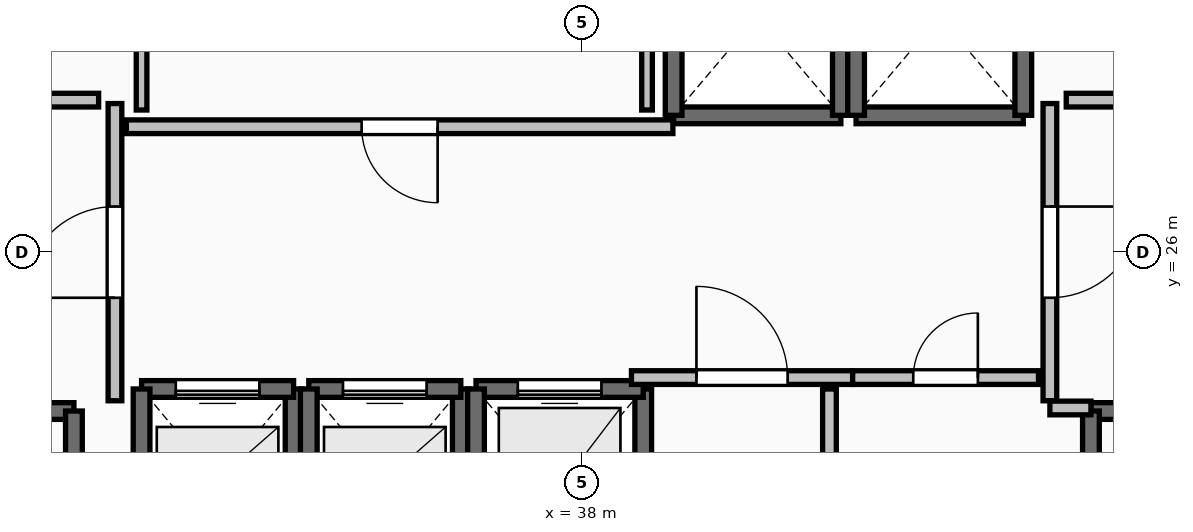
"""IFC4 building model, lengths in metres.
Left out: names, types, materials, properties, quantities, classifications, styles, units other than length and angle.
Written with IfcOpenShell. Run it as: python <this file> out.ifc"""

import sys

from ifc_helpers import new_model, si_unit, direction, frame, frame_2d, origin, place, context, subcontext, project, spatial, rectangle, extrude, element, fill, save


model = new_model("IFC4")
c1 = context("Model", 3, precision=1e-05, world=origin(), true_north=direction((0.0, 1.0)))
c2 = subcontext(c1, "Body", "Model", "MODEL_VIEW")
j1 = project(units=[si_unit("LENGTHUNIT", "METRE"), si_unit("PLANEANGLEUNIT", "RADIAN")], contexts=[c1])
p1 = place(None, origin())
s1 = spatial("IfcSite", under=j1, at=p1, CompositionType="ELEMENT")
p2 = place(p1, origin())
s2 = spatial("IfcBuilding", under=s1, at=p2, CompositionType="ELEMENT")
p3 = place(p2, frame((0.0, 0.0, 196.6)))
s3 = spatial("IfcBuildingStorey", under=s2, at=p3, CompositionType="ELEMENT", Elevation=196.6)
p4 = place(p3, frame((27.94, 23.91, 0.0), z_axis=(0.0, 0.0, 1.0), x_axis=(1.0, 0.0, 0.0)))
e1 = element("IfcWall", 1, at=p4, inside=s3, PredefinedType="SOLIDWALL", context=c2, shape_type="SweptSolid", body=[
    extrude(rectangle(XDim=3.37, YDim=0.22, at=frame_2d((1.685, 0.0))), origin(), (0.0, 0.0, 1.0), 3.24),
])
p5 = place(p4, frame((1.135, 0.0, 0.0)))
e2 = element("IfcOpeningElement", 2, at=p5, cuts=e1, PredefinedType="OPENING", context=c2, shape_type="SweptSolid", body=[
    extrude(rectangle(XDim=1.1, YDim=2.15, at=frame_2d((0.55, 1.075))), frame((0.0, 0.125, 0.0), z_axis=(0.0, -1.0, 0.0), x_axis=(1.0, 0.0, 0.0)), (0.0, 0.0, 1.0), 0.25),
])
p6 = place(p3, frame((31.31, 23.91, 0.0), z_axis=(0.0, 0.0, 1.0), x_axis=(0.0, -1.0, 0.0)))
e3 = element("IfcWall", 3, at=p6, inside=s3, PredefinedType="SOLIDWALL", context=c2, shape_type="SweptSolid", body=[
    extrude(rectangle(XDim=7.42, YDim=0.22, at=frame_2d((3.71, 0.0))), origin(), (0.0, 0.0, 1.0), 3.24),
])
p7 = place(p3, frame((44.69, 23.91, 0.0), z_axis=(0.0, 0.0, 1.0), x_axis=(1.0, 0.0, 0.0)))
e4 = element("IfcWall", 4, at=p7, inside=s3, PredefinedType="SOLIDWALL", context=c2, shape_type="SweptSolid", body=[
    extrude(rectangle(XDim=3.37, YDim=0.22, at=frame_2d((1.685, 0.0))), origin(), (0.0, 0.0, 1.0), 3.24),
])
p8 = place(p7, frame((1.135, 0.0, 0.0)))
e5 = element("IfcOpeningElement", 5, at=p8, cuts=e4, PredefinedType="OPENING", context=c2, shape_type="SweptSolid", body=[
    extrude(rectangle(XDim=1.1, YDim=2.15, at=frame_2d((0.55, 1.075))), frame((0.0, 0.125, 0.0), z_axis=(0.0, -1.0, 0.0), x_axis=(1.0, 0.0, 0.0)), (0.0, 0.0, 1.0), 0.25),
])
p9 = place(p3, frame((44.69, 16.49, 0.0), z_axis=(0.0, 0.0, 1.0), x_axis=(0.0, 1.0, 0.0)))
e6 = element("IfcWall", 6, at=p9, inside=s3, PredefinedType="SOLIDWALL", context=c2, shape_type="SweptSolid", body=[
    extrude(rectangle(XDim=7.42, YDim=0.22, at=frame_2d((3.71, 0.0))), origin(), (0.0, 0.0, 1.0), 3.24),
])
p10 = place(p3, frame((34.2, 21.8, 0.0), z_axis=(0.0, 0.0, 1.0), x_axis=(0.0, 1.0, 0.0)))
e7 = element("IfcWall", 7, at=p10, inside=s3, PredefinedType="SOLIDWALL", context=c2, shape_type="SweptSolid", body=[
    extrude(rectangle(XDim=2.4, YDim=0.22, at=frame_2d((1.2, 0.0))), origin(), (0.0, 0.0, 1.0), 3.24),
])
p11 = place(p3, frame((34.2, 24.2, 0.0), z_axis=(0.0, 0.0, 1.0), x_axis=(-1.0, 0.0, 0.0)))
e8 = element("IfcWall", 8, at=p11, inside=s3, PredefinedType="SOLIDWALL", context=c2, shape_type="SweptSolid", body=[
    extrude(rectangle(XDim=2.0, YDim=0.22, at=frame_2d((1.0, 0.0))), origin(), (0.0, 0.0, 1.0), 3.24),
])
p12 = place(p11, frame((0.45, 0.0, 0.0)))
e9 = element("IfcOpeningElement", 9, at=p12, cuts=e8, PredefinedType="OPENING", context=c2, shape_type="SweptSolid", body=[
    extrude(rectangle(XDim=1.1, YDim=2.2, at=frame_2d((0.55, 1.1))), frame((0.0, 0.125, 0.0), z_axis=(0.0, -1.0, 0.0), x_axis=(1.0, 0.0, 0.0)), (0.0, 0.0, 1.0), 0.25),
])
for number, where, z_axis, x_axis in (
    (10, (32.2, 24.2, 0.0), (0.0, 0.0, 1.0), (0.0, -1.0, 0.0)),
    (11, (36.4, 21.8, 0.0), (0.0, 0.0, 1.0), (0.0, 1.0, 0.0)),
):
    element("IfcWall", number, at=place(p3, frame(where, z_axis=z_axis, x_axis=x_axis)), inside=s3, PredefinedType="SOLIDWALL", context=c2, shape_type="SweptSolid", body=[
        extrude(rectangle(XDim=2.4, YDim=0.22, at=frame_2d((1.2, 0.0))), origin(), (0.0, 0.0, 1.0), 3.24),
    ])
p13 = place(p3, frame((36.4, 24.2, 0.0), z_axis=(0.0, 0.0, 1.0), x_axis=(-1.0, 0.0, 0.0)))
e12 = element("IfcWall", 12, at=p13, inside=s3, PredefinedType="SOLIDWALL", context=c2, shape_type="SweptSolid", body=[
    extrude(rectangle(XDim=2.0, YDim=0.22, at=frame_2d((1.0, 0.0))), origin(), (0.0, 0.0, 1.0), 3.24),
])
p14 = place(p13, frame((0.45, 0.0, 0.0)))
e13 = element("IfcOpeningElement", 13, at=p14, cuts=e12, PredefinedType="OPENING", context=c2, shape_type="SweptSolid", body=[
    extrude(rectangle(XDim=1.1, YDim=2.2, at=frame_2d((0.55, 1.1))), frame((0.0, 0.125, 0.0), z_axis=(0.0, -1.0, 0.0), x_axis=(1.0, 0.0, 0.0)), (0.0, 0.0, 1.0), 0.25),
])
p15 = place(p3, frame((34.4, 24.2, 0.0), z_axis=(0.0, 0.0, 1.0), x_axis=(0.0, -1.0, 0.0)))
e14 = element("IfcWall", 14, at=p15, inside=s3, PredefinedType="SOLIDWALL", context=c2, shape_type="SweptSolid", body=[
    extrude(rectangle(XDim=2.4, YDim=0.22, at=frame_2d((1.2, 0.0))), origin(), (0.0, 0.0, 1.0), 3.24),
])
p16 = place(p3, frame((38.8, 21.6, 0.0), z_axis=(0.0, 0.0, 1.0), x_axis=(0.0, 1.0, 0.0)))
e15 = element("IfcWall", 15, at=p16, inside=s3, PredefinedType="SOLIDWALL", context=c2, shape_type="SweptSolid", body=[
    extrude(rectangle(XDim=2.6, YDim=0.22, at=frame_2d((1.3, 0.0))), origin(), (0.0, 0.0, 1.0), 3.24),
])
p17 = place(p3, frame((38.8, 24.2, 0.0), z_axis=(0.0, 0.0, 1.0), x_axis=(-1.0, 0.0, 0.0)))
e16 = element("IfcWall", 16, at=p17, inside=s3, PredefinedType="SOLIDWALL", context=c2, shape_type="SweptSolid", body=[
    extrude(rectangle(XDim=2.2, YDim=0.22, at=frame_2d((1.1, 0.0))), origin(), (0.0, 0.0, 1.0), 3.24),
])
p18 = place(p17, frame((0.55, 0.0, 0.0)))
e17 = element("IfcOpeningElement", 17, at=p18, cuts=e16, PredefinedType="OPENING", context=c2, shape_type="SweptSolid", body=[
    extrude(rectangle(XDim=1.1, YDim=2.2, at=frame_2d((0.55, 1.1))), frame((0.0, 0.125, 0.0), z_axis=(0.0, -1.0, 0.0), x_axis=(1.0, 0.0, 0.0)), (0.0, 0.0, 1.0), 0.25),
])
p19 = place(p3, frame((36.6, 24.2, 0.0), z_axis=(0.0, 0.0, 1.0), x_axis=(0.0, -1.0, 0.0)))
e18 = element("IfcWall", 18, at=p19, inside=s3, PredefinedType="SOLIDWALL", context=c2, shape_type="SweptSolid", body=[
    extrude(rectangle(XDim=2.6, YDim=0.22, at=frame_2d((1.3, 0.0))), origin(), (0.0, 0.0, 1.0), 3.24),
])
p20 = place(p3, frame((39.2, 27.8, 0.0), z_axis=(0.0, 0.0, 1.0), x_axis=(1.0, 0.0, 0.0)))
e19 = element("IfcWall", 19, at=p20, inside=s3, PredefinedType="SOLIDWALL", context=c2, shape_type="SweptSolid", body=[
    extrude(rectangle(XDim=2.2, YDim=0.22, at=frame_2d((1.1, 0.0))), origin(), (0.0, 0.0, 1.0), 3.24),
])
for number, where, z_axis, x_axis in (
    (20, (41.4, 27.8, 0.0), (0.0, 0.0, 1.0), (0.0, 1.0, 0.0)),
    (21, (39.2, 30.4, 0.0), (0.0, 0.0, 1.0), (0.0, -1.0, 0.0)),
):
    element("IfcWall", number, at=place(p3, frame(where, z_axis=z_axis, x_axis=x_axis)), inside=s3, PredefinedType="SOLIDWALL", context=c2, shape_type="SweptSolid", body=[
        extrude(rectangle(XDim=2.6, YDim=0.22, at=frame_2d((1.3, 0.0))), origin(), (0.0, 0.0, 1.0), 3.24),
    ])
p21 = place(p3, frame((41.6, 27.8, 0.0), z_axis=(0.0, 0.0, 1.0), x_axis=(1.0, 0.0, 0.0)))
e22 = element("IfcWall", 22, at=p21, inside=s3, PredefinedType="SOLIDWALL", context=c2, shape_type="SweptSolid", body=[
    extrude(rectangle(XDim=2.2, YDim=0.22, at=frame_2d((1.1, 0.0))), origin(), (0.0, 0.0, 1.0), 3.24),
])
for number, where, z_axis, x_axis in (
    (23, (43.8, 27.8, 0.0), (0.0, 0.0, 1.0), (0.0, 1.0, 0.0)),
    (24, (41.6, 30.4, 0.0), (0.0, 0.0, 1.0), (0.0, -1.0, 0.0)),
):
    element("IfcWall", number, at=place(p3, frame(where, z_axis=z_axis, x_axis=x_axis)), inside=s3, PredefinedType="SOLIDWALL", context=c2, shape_type="SweptSolid", body=[
        extrude(rectangle(XDim=2.6, YDim=0.22, at=frame_2d((1.3, 0.0))), origin(), (0.0, 0.0, 1.0), 3.24),
    ])
p22 = place(p3, frame((31.85, 24.045, 0.0), z_axis=(0.0, 0.0, 1.0), x_axis=(0.0, 1.0, 0.0)))
e25 = element("IfcWall", 25, at=p22, inside=s3, PredefinedType="PARTITIONING", context=c2, shape_type="SweptSolid", body=[
    extrude(rectangle(XDim=3.91, YDim=0.18, at=frame_2d((1.955, 0.0))), origin(), (0.0, 0.0, 1.0), 3.24),
])
p23 = place(p22, frame((1.355, 0.0, 0.0)))
e26 = element("IfcOpeningElement", 26, at=p23, cuts=e25, PredefinedType="OPENING", context=c2, shape_type="SweptSolid", body=[
    extrude(rectangle(XDim=1.2, YDim=2.15, at=frame_2d((0.6, 1.075))), frame((0.0, 0.105, 0.0), z_axis=(0.0, -1.0, 0.0), x_axis=(1.0, 0.0, 0.0)), (0.0, 0.0, 1.0), 0.21),
])
p24 = place(p3, frame((44.15, 27.955, 0.0), z_axis=(0.0, 0.0, 1.0), x_axis=(0.0, -1.0, 0.0)))
e27 = element("IfcWall", 27, at=p24, inside=s3, PredefinedType="PARTITIONING", context=c2, shape_type="SweptSolid", body=[
    extrude(rectangle(XDim=3.91, YDim=0.18, at=frame_2d((1.955, 0.0))), origin(), (0.0, 0.0, 1.0), 3.24),
])
p25 = place(p24, frame((1.355, 0.0, 0.0)))
e28 = element("IfcOpeningElement", 28, at=p25, cuts=e27, PredefinedType="OPENING", context=c2, shape_type="SweptSolid", body=[
    extrude(rectangle(XDim=1.2, YDim=2.15, at=frame_2d((0.6, 1.075))), frame((0.0, 0.105, 0.0), z_axis=(0.0, -1.0, 0.0), x_axis=(1.0, 0.0, 0.0)), (0.0, 0.0, 1.0), 0.21),
])
p26 = place(p3, frame((44.15, 23.95, 0.0), z_axis=(0.0, 0.0, 1.0), x_axis=(1.0, 0.0, 0.0)))
e29 = element("IfcWall", 29, at=p26, inside=s3, PredefinedType="PARTITIONING", context=c2, shape_type="SweptSolid", body=[
    extrude(rectangle(XDim=0.54, YDim=0.18, at=frame_2d((0.27, 0.0))), origin(), (0.0, 0.0, 1.0), 3.24),
])
p27 = place(p3, frame((38.645, 24.35, 0.0), z_axis=(0.0, 0.0, 1.0), x_axis=(1.0, 0.0, 0.0)))
e30 = element("IfcWall", 30, at=p27, inside=s3, PredefinedType="PARTITIONING", context=c2, shape_type="SweptSolid", body=[
    extrude(rectangle(XDim=2.91, YDim=0.18, at=frame_2d((1.455, 0.0))), origin(), (0.0, 0.0, 1.0), 3.24),
])
p28 = place(p27, frame((0.855, 0.0, 0.0)))
e31 = element("IfcOpeningElement", 31, at=p28, cuts=e30, PredefinedType="OPENING", context=c2, shape_type="SweptSolid", body=[
    extrude(rectangle(XDim=1.2, YDim=2.15, at=frame_2d((0.6, 1.075))), frame((0.0, 0.105, 0.0), z_axis=(0.0, -1.0, 0.0), x_axis=(1.0, 0.0, 0.0)), (0.0, 0.0, 1.0), 0.21),
])
p29 = place(p3, frame((41.555, 24.35, 0.0), z_axis=(0.0, 0.0, 1.0), x_axis=(1.0, 0.0, 0.0)))
e32 = element("IfcWall", 32, at=p29, inside=s3, PredefinedType="PARTITIONING", context=c2, shape_type="SweptSolid", body=[
    extrude(rectangle(XDim=2.445, YDim=0.18, at=frame_2d((1.223, 0.0))), origin(), (0.0, 0.0, 1.0), 3.24),
])
p30 = place(p29, frame((0.798, 0.0, 0.0)))
e33 = element("IfcOpeningElement", 33, at=p30, cuts=e32, PredefinedType="OPENING", context=c2, shape_type="SweptSolid", body=[
    extrude(rectangle(XDim=0.85, YDim=2.1, at=frame_2d((0.425, 1.05))), frame((0.0, 0.105, 0.0), z_axis=(0.0, -1.0, 0.0), x_axis=(1.0, 0.0, 0.0)), (0.0, 0.0, 1.0), 0.21),
])
p31 = place(p3, frame((39.19, 27.65, 0.0), z_axis=(0.0, 0.0, 1.0), x_axis=(-1.0, 0.0, 0.0)))
e34 = element("IfcWall", 34, at=p31, inside=s3, PredefinedType="PARTITIONING", context=c2, shape_type="SweptSolid", body=[
    extrude(rectangle(XDim=7.19, YDim=0.18, at=frame_2d((3.595, 0.0))), origin(), (0.0, 0.0, 1.0), 3.24),
])
p32 = place(p31, frame((3.095, 0.0, 0.0)))
e35 = element("IfcOpeningElement", 35, at=p32, cuts=e34, PredefinedType="OPENING", context=c2, shape_type="SweptSolid", body=[
    extrude(rectangle(XDim=1.0, YDim=2.15, at=frame_2d((0.5, 1.075))), frame((0.0, 0.105, 0.0), z_axis=(0.0, -1.0, 0.0), x_axis=(1.0, 0.0, 0.0)), (0.0, 0.0, 1.0), 0.21),
])
p33 = place(p3, frame((41.25, 20.305, 0.0), z_axis=(0.0, 0.0, 1.0), x_axis=(0.0, 1.0, 0.0)))
e36 = element("IfcWall", 36, at=p33, inside=s3, PredefinedType="PARTITIONING", context=c2, shape_type="SweptSolid", body=[
    extrude(rectangle(XDim=3.895, YDim=0.18, at=frame_2d((1.948, 0.0))), origin(), (0.0, 0.0, 1.0), 3.24),
])
p34 = place(p33, frame((1.522, 0.0, 0.0)))
e37 = element("IfcOpeningElement", 37, at=p34, cuts=e36, PredefinedType="OPENING", context=c2, shape_type="SweptSolid", body=[
    extrude(rectangle(XDim=0.85, YDim=2.1, at=frame_2d((0.425, 1.05))), frame((0.0, 0.105, 0.0), z_axis=(0.0, -1.0, 0.0), x_axis=(1.0, 0.0, 0.0)), (0.0, 0.0, 1.0), 0.21),
])
for number, where, z_axis, x_axis in (
    (38, (31.635, 28.0, 0.0), (0.0, 0.0, 1.0), (-1.0, 0.0, 0.0)),
    (39, (45.28, 28.0, 0.0), (0.0, 0.0, 1.0), (-1.0, 0.0, 0.0)),
):
    element("IfcWall", number, at=place(p3, frame(where, z_axis=z_axis, x_axis=x_axis)), inside=s3, PredefinedType="PARTITIONING", context=c2, shape_type="SweptSolid", body=[
        extrude(rectangle(XDim=0.915, YDim=0.18, at=frame_2d((0.458, 0.0))), origin(), (0.0, 0.0, 1.0), 3.24),
    ])
for number, where, z_axis, x_axis in (
    (40, (32.2, 30.26, 0.0), (0.0, 0.0, 1.0), (0.0, -1.0, 0.0)),
    (41, (38.85, 27.87, 0.0), (0.0, 0.0, 1.0), (0.0, 1.0, 0.0)),
):
    element("IfcWall", number, at=place(p3, frame(where, z_axis=z_axis, x_axis=x_axis)), inside=s3, PredefinedType="PARTITIONING", context=c2, shape_type="SweptSolid", body=[
        extrude(rectangle(XDim=2.39, YDim=0.14, at=frame_2d((1.195, 0.0))), origin(), (0.0, 0.0, 1.0), 3.24),
    ])
p35 = place(p12, origin())
e42 = element("IfcDoor", 42, at=p35, inside=s3, OperationType="SLIDING_TO_LEFT", PredefinedType="DOOR", context=c2, shape_type="SweptSolid", body=[
    extrude(rectangle(XDim=1.1, YDim=2.2, at=frame_2d((0.55, 1.1))), frame((0.0, 0.025, 0.0), z_axis=(0.0, -1.0, 0.0), x_axis=(1.0, 0.0, 0.0)), (0.0, 0.0, 1.0), 0.05),
])
fill(e9, e42)
p36 = place(p14, origin())
e43 = element("IfcDoor", 43, at=p36, inside=s3, OperationType="SLIDING_TO_LEFT", PredefinedType="DOOR", context=c2, shape_type="SweptSolid", body=[
    extrude(rectangle(XDim=1.1, YDim=2.2, at=frame_2d((0.55, 1.1))), frame((0.0, 0.025, 0.0), z_axis=(0.0, -1.0, 0.0), x_axis=(1.0, 0.0, 0.0)), (0.0, 0.0, 1.0), 0.05),
])
fill(e13, e43)
p37 = place(p18, origin())
e44 = element("IfcDoor", 44, at=p37, inside=s3, OperationType="SLIDING_TO_LEFT", PredefinedType="DOOR", context=c2, shape_type="SweptSolid", body=[
    extrude(rectangle(XDim=1.1, YDim=2.2, at=frame_2d((0.55, 1.1))), frame((0.0, 0.025, 0.0), z_axis=(0.0, -1.0, 0.0), x_axis=(1.0, 0.0, 0.0)), (0.0, 0.0, 1.0), 0.05),
])
fill(e17, e44)
p38 = place(p23, origin())
e45 = element("IfcDoor", 45, at=p38, inside=s3, OperationType="SINGLE_SWING_LEFT", PredefinedType="DOOR", context=c2, shape_type="SweptSolid", body=[
    extrude(rectangle(XDim=1.2, YDim=2.15, at=frame_2d((0.6, 1.075))), frame((0.0, 0.025, 0.0), z_axis=(0.0, -1.0, 0.0), x_axis=(1.0, 0.0, 0.0)), (0.0, 0.0, 1.0), 0.05),
])
fill(e26, e45)
p39 = place(p25, origin())
e46 = element("IfcDoor", 46, at=p39, inside=s3, OperationType="SINGLE_SWING_LEFT", PredefinedType="DOOR", context=c2, shape_type="SweptSolid", body=[
    extrude(rectangle(XDim=1.2, YDim=2.15, at=frame_2d((0.6, 1.075))), frame((0.0, 0.025, 0.0), z_axis=(0.0, -1.0, 0.0), x_axis=(1.0, 0.0, 0.0)), (0.0, 0.0, 1.0), 0.05),
])
fill(e28, e46)
p40 = place(p28, origin())
e47 = element("IfcDoor", 47, at=p40, inside=s3, OperationType="SINGLE_SWING_LEFT", PredefinedType="DOOR", context=c2, shape_type="SweptSolid", body=[
    extrude(rectangle(XDim=1.2, YDim=2.15, at=frame_2d((0.6, 1.075))), frame((0.0, 0.025, 0.0), z_axis=(0.0, -1.0, 0.0), x_axis=(1.0, 0.0, 0.0)), (0.0, 0.0, 1.0), 0.05),
])
fill(e31, e47)
p41 = place(p30, origin())
e48 = element("IfcDoor", 48, at=p41, inside=s3, OperationType="SINGLE_SWING_RIGHT", PredefinedType="DOOR", context=c2, shape_type="SweptSolid", body=[
    extrude(rectangle(XDim=0.85, YDim=2.1, at=frame_2d((0.425, 1.05))), frame((0.0, 0.025, 0.0), z_axis=(0.0, -1.0, 0.0), x_axis=(1.0, 0.0, 0.0)), (0.0, 0.0, 1.0), 0.05),
])
fill(e33, e48)
p42 = place(p32, origin())
e49 = element("IfcDoor", 49, at=p42, inside=s3, OperationType="SINGLE_SWING_LEFT", PredefinedType="DOOR", context=c2, shape_type="SweptSolid", body=[
    extrude(rectangle(XDim=1.0, YDim=2.15, at=frame_2d((0.5, 1.075))), frame((0.0, 0.025, 0.0), z_axis=(0.0, -1.0, 0.0), x_axis=(1.0, 0.0, 0.0)), (0.0, 0.0, 1.0), 0.05),
])
fill(e35, e49)
save(model, sys.argv[1])
